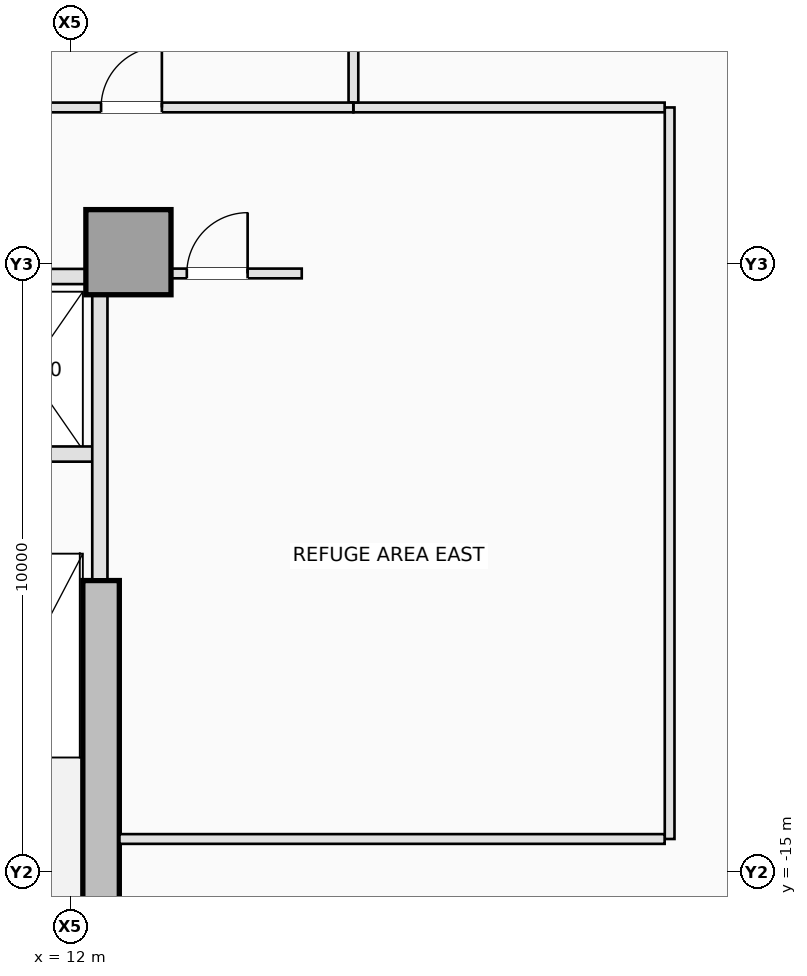
"""IFC4 building model, lengths in metres.
Left out: names, types, materials, properties, quantities, classifications, styles, units other than length and angle.
Written with IfcOpenShell. Run it as: python <this file> out.ifc"""

import sys

from ifc_helpers import new_model, si_unit, direction, frame, frame_2d, origin, origin_2d, place, context, subcontext, project, spatial, rectangle, extrude, element, fill, save


model = new_model("IFC4")
c1 = context("Model", 3, precision=1e-05, world=origin(), true_north=direction((0.0, 1.0)))
c2 = subcontext(c1, "Body", "Model", "MODEL_VIEW")
j1 = project(units=[si_unit("LENGTHUNIT", "METRE"), si_unit("PLANEANGLEUNIT", "RADIAN")], contexts=[c1])
p1 = place(None, origin())
s1 = spatial("IfcSite", under=j1, at=p1, CompositionType="ELEMENT")
p2 = place(p1, origin())
s2 = spatial("IfcBuilding", under=s1, at=p2, CompositionType="ELEMENT")
p3 = place(p2, frame((0.0, 0.0, 23.0)))
s3 = spatial("IfcBuildingStorey", under=s2, at=p3, CompositionType="ELEMENT", Elevation=23.0)
p4 = place(p3, frame((12.5, -15.8, 0.0), z_axis=(0.0, 0.0, 1.0), x_axis=(0.0, 1.0, 0.0)))
e1 = element("IfcWall", 1, at=p4, inside=s3, PredefinedType="SHEAR", context=c2, shape_type="SweptSolid", body=[
    extrude(rectangle(XDim=5.6, YDim=0.6, at=frame_2d((2.8, 0.0))), origin(), (0.0, 0.0, 1.0), 4.6),
])
p5 = place(p3, frame((12.95, -4.8, 0.0), z_axis=(0.0, 0.0, 1.0), x_axis=(1.0, 0.0, 0.0)))
e2 = element("IfcColumn", 2, at=p5, inside=s3, PredefinedType="COLUMN", context=c2, shape_type="SweptSolid", body=[
    extrude(rectangle(XDim=1.4, YDim=1.4, at=origin_2d()), origin(), (0.0, 0.0, 1.0), 4.6),
])
p6 = place(p3, frame((9.16, -8.12, 0.0), z_axis=(0.0, 0.0, 1.0), x_axis=(1.0, 0.0, 0.0)))
e3 = element("IfcWall", 3, at=p6, inside=s3, PredefinedType="PARTITIONING", context=c2, shape_type="SweptSolid", body=[
    extrude(rectangle(XDim=3.22, YDim=0.25, at=frame_2d((1.61, 0.0))), origin(), (0.0, 0.0, 1.0), 4.35),
])
p7 = place(p3, frame((12.48, -10.18, 0.0), z_axis=(0.0, 0.0, 1.0), x_axis=(0.0, 1.0, 0.0)))
e4 = element("IfcWall", 4, at=p7, inside=s3, PredefinedType="PARTITIONING", context=c2, shape_type="SweptSolid", body=[
    extrude(rectangle(XDim=4.678, YDim=0.25, at=frame_2d((2.339, 0.0))), origin(), (0.0, 0.0, 1.0), 4.35),
])
p8 = place(p3, frame((4.452, -5.2, 0.0), z_axis=(0.0, 0.0, 1.0), x_axis=(1.0, 0.0, 0.0)))
e5 = element("IfcWall", 5, at=p8, inside=s3, PredefinedType="PARTITIONING", context=c2, shape_type="SweptSolid", body=[
    extrude(rectangle(XDim=7.796, YDim=0.25, at=frame_2d((3.898, 0.0))), origin(), (0.0, 0.0, 1.0), 2.55),
])
p9 = place(p3, frame((21.85, -14.45, 0.0), z_axis=(0.0, 0.0, 1.0), x_axis=(0.0, 1.0, 0.0)))
e6 = element("IfcWall", 6, at=p9, inside=s3, PredefinedType="PARTITIONING", context=c2, shape_type="SweptSolid", body=[
    extrude(rectangle(XDim=12.03, YDim=0.16, at=frame_2d((6.015, 0.0))), origin(), (0.0, 0.0, 1.0), 4.35),
])
p10 = place(p3, frame((12.802, -14.45, 0.0), z_axis=(0.0, 0.0, 1.0), x_axis=(1.0, 0.0, 0.0)))
e7 = element("IfcWall", 7, at=p10, inside=s3, PredefinedType="PARTITIONING", context=c2, shape_type="SweptSolid", body=[
    extrude(rectangle(XDim=8.966, YDim=0.16, at=frame_2d((4.483, 0.0))), origin(), (0.0, 0.0, 1.0), 4.35),
])
p11 = place(p3, frame((16.65, -2.42, 0.0), z_axis=(0.0, 0.0, 1.0), x_axis=(1.0, 0.0, 0.0)))
e8 = element("IfcWall", 8, at=p11, inside=s3, PredefinedType="PARTITIONING", context=c2, shape_type="SweptSolid", body=[
    extrude(rectangle(XDim=5.118, YDim=0.16, at=frame_2d((2.559, 0.0))), origin(), (0.0, 0.0, 1.0), 4.35),
])
p12 = place(p3, frame((16.65, -2.338, 0.0), z_axis=(0.0, 0.0, 1.0), x_axis=(0.0, 1.0, 0.0)))
e9 = element("IfcWall", 9, at=p12, inside=s3, PredefinedType="PARTITIONING", context=c2, shape_type="SweptSolid", body=[
    extrude(rectangle(XDim=7.008, YDim=0.16, at=frame_2d((3.504, 0.0))), origin(), (0.0, 0.0, 1.0), 4.35),
])
p13 = place(p3, frame((11.402, -2.42, 0.0), z_axis=(0.0, 0.0, 1.0), x_axis=(1.0, 0.0, 0.0)))
e10 = element("IfcWall", 10, at=p13, inside=s3, PredefinedType="PARTITIONING", context=c2, shape_type="SweptSolid", body=[
    extrude(rectangle(XDim=5.246, YDim=0.16, at=frame_2d((2.623, 0.0))), origin(), (0.0, 0.0, 1.0), 4.35),
])
p14 = place(p13, frame((1.098, 0.0, 0.0)))
e11 = element("IfcOpeningElement", 11, at=p14, cuts=e10, PredefinedType="OPENING", context=c2, shape_type="SweptSolid", body=[
    extrude(rectangle(XDim=1.0, YDim=2.15, at=frame_2d((0.5, 1.075))), frame((0.0, 0.09, 0.0), z_axis=(0.0, -1.0, 0.0), x_axis=(1.0, 0.0, 0.0)), (0.0, 0.0, 1.0), 0.18),
])
p15 = place(p3, frame((13.652, -5.15, 0.0), z_axis=(0.0, 0.0, 1.0), x_axis=(1.0, 0.0, 0.0)))
e12 = element("IfcWall", 12, at=p15, inside=s3, PredefinedType="PARTITIONING", context=c2, shape_type="SweptSolid", body=[
    extrude(rectangle(XDim=2.148, YDim=0.16, at=frame_2d((1.074, 0.0))), origin(), (0.0, 0.0, 1.0), 2.55),
])
p16 = place(p15, frame((0.258, 0.0, 0.0)))
e13 = element("IfcOpeningElement", 13, at=p16, cuts=e12, PredefinedType="OPENING", context=c2, shape_type="SweptSolid", body=[
    extrude(rectangle(XDim=1.0, YDim=2.15, at=frame_2d((0.5, 1.075))), frame((0.0, 0.09, 0.0), z_axis=(0.0, -1.0, 0.0), x_axis=(1.0, 0.0, 0.0)), (0.0, 0.0, 1.0), 0.18),
])
p17 = place(p14, origin())
e14 = element("IfcDoor", 14, at=p17, inside=s3, OperationType="SINGLE_SWING_RIGHT", PredefinedType="DOOR", context=c2, shape_type="SweptSolid", body=[
    extrude(rectangle(XDim=1.0, YDim=2.15, at=frame_2d((0.5, 1.075))), frame((0.0, 0.025, 0.0), z_axis=(0.0, -1.0, 0.0), x_axis=(1.0, 0.0, 0.0)), (0.0, 0.0, 1.0), 0.05),
])
fill(e11, e14)
p18 = place(p16, origin())
e15 = element("IfcDoor", 15, at=p18, inside=s3, OperationType="SINGLE_SWING_RIGHT", PredefinedType="DOOR", context=c2, shape_type="SweptSolid", body=[
    extrude(rectangle(XDim=1.0, YDim=2.15, at=frame_2d((0.5, 1.075))), frame((0.0, 0.025, 0.0), z_axis=(0.0, -1.0, 0.0), x_axis=(1.0, 0.0, 0.0)), (0.0, 0.0, 1.0), 0.05),
])
fill(e13, e15)
save(model, sys.argv[1])
